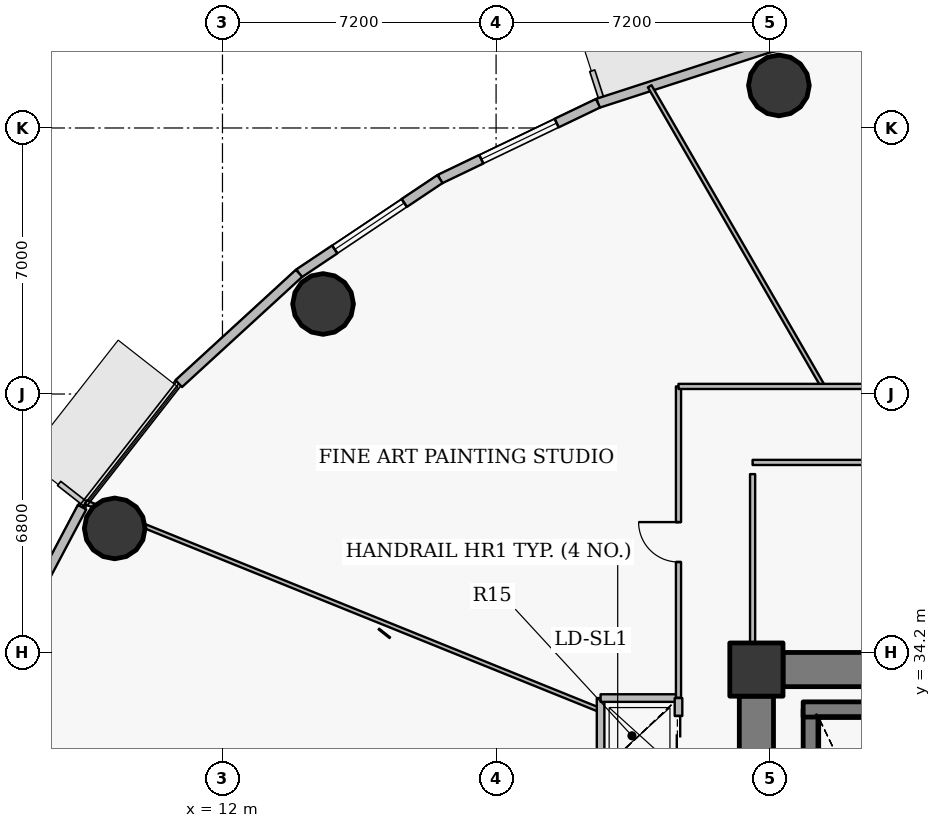
"""IFC4 building model, lengths in metres.
Left out: names, types, materials, properties, quantities, classifications, styles, units other than length and angle.
Written with IfcOpenShell. Run it as: python <this file> out.ifc"""

import sys

from ifc_helpers import new_model, si_unit, direction, frame, frame_2d, origin, origin_2d, place, context, subcontext, project, spatial, rectangle, hollow_circle, extrude, source, transform, mapped, element, fill, save


model = new_model("IFC4")
c1 = context("Model", 3, precision=1e-05, world=origin(), true_north=direction((0.0, 1.0)))
c2 = subcontext(c1, "Body", "Model", "MODEL_VIEW")
j1 = project(units=[si_unit("LENGTHUNIT", "METRE"), si_unit("PLANEANGLEUNIT", "RADIAN")], contexts=[c1])
p1 = place(None, origin())
s1 = spatial("IfcSite", under=j1, at=p1, CompositionType="ELEMENT")
p2 = place(p1, origin())
s2 = spatial("IfcBuilding", under=s1, at=p2, CompositionType="ELEMENT")
p3 = place(p2, frame((0.0, 0.0, 49.2)))
s3 = spatial("IfcBuildingStorey", under=s2, at=p3, CompositionType="ELEMENT", Elevation=49.2)
p4 = place(p3, frame((26.05, 33.75, 0.0), z_axis=(0.0, 0.0, 1.0), x_axis=(1.0, 0.0, 0.0)))
e1 = element("IfcColumn", 1, at=p4, inside=s3, PredefinedType="COLUMN", context=c2, shape_type="SweptSolid", body=[
    extrude(rectangle(XDim=1.4, YDim=1.4, at=origin_2d()), origin(), (0.0, 0.0, 1.0), 4.2),
])
p5 = place(p3, frame((27.48, 24.1, 0.0), z_axis=(0.0, 0.0, 1.0), x_axis=(0.0, 1.0, 0.0)))
e2 = element("IfcWall", 2, at=p5, inside=s3, PredefinedType="SHEAR", context=c2, shape_type="SweptSolid", body=[
    extrude(rectangle(XDim=8.6, YDim=0.4, at=frame_2d((4.3, 0.0))), origin(), (0.0, 0.0, 1.0), 4.2),
])
p6 = place(p3, frame((27.28, 32.7, 0.0), z_axis=(0.0, 0.0, 1.0), x_axis=(1.0, 0.0, 0.0)))
e3 = element("IfcWall", 3, at=p6, inside=s3, PredefinedType="SHEAR", context=c2, shape_type="SweptSolid", body=[
    extrude(rectangle(XDim=4.1, YDim=0.4, at=frame_2d((2.05, 0.0))), origin(), (0.0, 0.0, 1.0), 4.2),
])
p7 = place(p3, frame((26.75, 33.75, 0.0), z_axis=(0.0, 0.0, 1.0), x_axis=(1.0, 0.0, 0.0)))
e4 = element("IfcWall", 4, at=p7, inside=s3, PredefinedType="SHEAR", context=c2, shape_type="SweptSolid", body=[
    extrude(rectangle(XDim=18.5, YDim=0.9, at=frame_2d((9.25, 0.0))), origin(), (0.0, 0.0, 1.0), 3.4),
])
p8 = place(p3, frame((26.05, 20.95, 0.0), z_axis=(0.0, 0.0, 1.0), x_axis=(0.0, 1.0, 0.0)))
e5 = element("IfcWall", 5, at=p8, inside=s3, PredefinedType="SHEAR", context=c2, shape_type="SweptSolid", body=[
    extrude(rectangle(XDim=12.1, YDim=0.9, at=frame_2d((6.05, 0.0))), origin(), (0.0, 0.0, 1.0), 3.4),
])
p9 = place(p8, frame((5.64, 0.0, 0.0)))
e6 = element("IfcOpeningElement", 6, at=p9, cuts=e5, PredefinedType="OPENING", context=c2, shape_type="SweptSolid", body=[
    extrude(rectangle(XDim=0.82, YDim=2.1, at=origin_2d()), frame((0.41, 0.46, 1.05), z_axis=(0.0, -1.0, 0.0), x_axis=(1.0, 0.0, 0.0)), (0.0, 0.0, 1.0), 0.92),
])
for number, where, z_axis, x_axis in (
    (7, (26.642, 49.12, 0.0), (0.0, 0.0, 1.0), (1.0, 0.0, 0.0)),
    (8, (14.647, 43.369, 0.0), (0.0, 0.0, 1.0), (1.0, 0.0, 0.0)),
    (9, (9.165, 37.464, 0.0), (0.0, 0.0, 1.0), (1.0, 0.0, 0.0)),
):
    element("IfcColumn", number, at=place(p3, frame(where, z_axis=z_axis, x_axis=x_axis)), inside=s3, PredefinedType="COLUMN", context=c2, shape_type="SweptSolid", body=[
        extrude(hollow_circle(Radius=0.8, WallThickness=0.045, at=origin_2d()), origin(), (0.0, 0.0, 1.0), 4.2),
    ])
p10 = place(p3, frame((21.882, 48.651, 0.0), z_axis=(0.0, 0.0, 1.0), x_axis=(0.951207699013, 0.308551313946, 0.0)))
e10 = element("IfcWall", 10, at=p10, inside=s3, PredefinedType="SOLIDWALL", context=c2, shape_type="SweptSolid", body=[
    extrude(rectangle(XDim=4.739, YDim=0.25, at=frame_2d((2.369, 0.0))), origin(), (0.0, 0.0, 1.0), 3.95),
])
p11 = place(p3, frame((17.723, 46.656, 0.0), z_axis=(0.0, 0.0, 1.0), x_axis=(0.901601503137, 0.432567601123, 0.0)))
e11 = element("IfcWall", 11, at=p11, inside=s3, PredefinedType="SOLIDWALL", context=c2, shape_type="SweptSolid", body=[
    extrude(rectangle(XDim=4.613, YDim=0.25, at=frame_2d((2.306, 0.0))), origin(), (0.0, 0.0, 1.0), 3.95),
])
p12 = place(p11, frame((1.207, 0.0, 0.9)))
e12 = element("IfcOpeningElement", 12, at=p12, cuts=e11, PredefinedType="OPENING", context=c2, shape_type="SweptSolid", body=[
    extrude(rectangle(XDim=2.2, YDim=2.0, at=origin_2d()), frame((1.1, 0.135, 1.0), z_axis=(0.0, -1.0, 0.0), x_axis=(1.0, 0.0, 0.0)), (0.0, 0.0, 1.0), 0.27),
])
p13 = place(p3, frame((14.015, 44.176, 0.0), z_axis=(0.0, 0.0, 1.0), x_axis=(0.831240982525, 0.555912249343, 0.0)))
e13 = element("IfcWall", 13, at=p13, inside=s3, PredefinedType="SOLIDWALL", context=c2, shape_type="SweptSolid", body=[
    extrude(rectangle(XDim=4.46, YDim=0.25, at=frame_2d((2.23, 0.0))), origin(), (0.0, 0.0, 1.0), 3.95),
])
p14 = place(p13, frame((1.13, 0.0, 0.9)))
e14 = element("IfcOpeningElement", 14, at=p14, cuts=e13, PredefinedType="OPENING", context=c2, shape_type="SweptSolid", body=[
    extrude(rectangle(XDim=2.2, YDim=2.0, at=origin_2d()), frame((1.1, 0.135, 1.0), z_axis=(0.0, -1.0, 0.0), x_axis=(1.0, 0.0, 0.0)), (0.0, 0.0, 1.0), 0.27),
])
p15 = place(p3, frame((10.85, 41.275, 0.0), z_axis=(0.0, 0.0, 1.0), x_axis=(0.737116376281, 0.67576582321, 0.0)))
e15 = element("IfcWall", 15, at=p15, inside=s3, PredefinedType="SOLIDWALL", context=c2, shape_type="SweptSolid", body=[
    extrude(rectangle(XDim=4.294, YDim=0.25, at=frame_2d((2.147, 0.0))), origin(), (0.0, 0.0, 1.0), 3.95),
])
p16 = place(p3, frame((6.442, 34.501, 0.0), z_axis=(0.0, 0.0, 1.0), x_axis=(0.467662443071, 0.883907144072, 0.0)))
e16 = element("IfcWall", 16, at=p16, inside=s3, PredefinedType="SOLIDWALL", context=c2, shape_type="SweptSolid", body=[
    extrude(rectangle(XDim=3.984, YDim=0.25, at=frame_2d((1.992, 0.0))), origin(), (0.0, 0.0, 1.0), 3.95),
])
p17 = place(p3, frame((8.4, 38.151, 0.0), z_axis=(0.0, 0.0, 1.0), x_axis=(0.927179581649, -0.374617169084, 0.0)))
e17 = element("IfcWall", 17, at=p17, inside=s3, PredefinedType="MOVABLE", context=c2, shape_type="SweptSolid", body=[
    extrude(rectangle(XDim=14.615, YDim=0.11, at=frame_2d((7.307, 0.0))), origin(), (0.0, 0.0, 1.0), 3.285),
])
p18 = place(p3, frame((21.95, 31.12, 0.0), z_axis=(0.0, 0.0, 1.0), x_axis=(0.0, 1.0, 0.0)))
e18 = element("IfcWall", 18, at=p18, inside=s3, PredefinedType="PARTITIONING", context=c2, shape_type="SweptSolid", body=[
    extrude(rectangle(XDim=1.88, YDim=0.2, at=frame_2d((0.94, 0.0))), origin(), (0.0, 0.0, 1.0), 3.285),
])
p19 = place(p3, frame((21.95, 33.0, 0.0), z_axis=(0.0, 0.0, 1.0), x_axis=(1.0, 0.0, 0.0)))
e19 = element("IfcWall", 19, at=p19, inside=s3, PredefinedType="PARTITIONING", context=c2, shape_type="SweptSolid", body=[
    extrude(rectangle(XDim=2.05, YDim=0.2, at=frame_2d((1.025, 0.0))), origin(), (0.0, 0.0, 1.0), 3.95),
])
p20 = place(p3, frame((23.242, 49.098, 0.0), z_axis=(0.0, 0.0, 1.0), x_axis=(0.499985867395, -0.866033563094, 0.0)))
e20 = element("IfcWall", 20, at=p20, inside=s3, PredefinedType="MOVABLE", context=c2, shape_type="SweptSolid", body=[
    extrude(rectangle(XDim=9.119, YDim=0.11, at=frame_2d((4.56, 0.0))), origin(), (0.0, 0.0, 1.0), 3.335),
])
p21 = place(p3, frame((24.0, 27.59, 0.0), z_axis=(0.0, 0.0, 1.0), x_axis=(0.0, 1.0, 0.0)))
e21 = element("IfcWall", 21, at=p21, inside=s3, PredefinedType="PARTITIONING", context=c2, shape_type="SweptSolid", body=[
    extrude(rectangle(XDim=5.41, YDim=0.2, at=frame_2d((2.705, 0.0))), origin(), (0.0, 0.0, 1.0), 3.285),
])
p22 = place(p21, frame((1.185, 0.0, 0.0)))
e22 = element("IfcOpeningElement", 22, at=p22, cuts=e21, PredefinedType="OPENING", context=c2, shape_type="SweptSolid", body=[
    extrude(rectangle(XDim=1.2, YDim=2.15, at=origin_2d()), frame((0.6, 0.11, 1.075), z_axis=(0.0, -1.0, 0.0), x_axis=(1.0, 0.0, 0.0)), (0.0, 0.0, 1.0), 0.22),
])
p23 = place(p21, frame((3.89, 0.0, 0.0)))
e23 = element("IfcOpeningElement", 23, at=p23, cuts=e21, PredefinedType="OPENING", context=c2, shape_type="SweptSolid", body=[
    extrude(rectangle(XDim=1.05, YDim=2.15, at=origin_2d()), frame((0.525, 0.11, 1.075), z_axis=(0.0, -1.0, 0.0), x_axis=(1.0, 0.0, 0.0)), (0.0, 0.0, 1.0), 0.22),
])
p24 = place(p3, frame((24.0, 33.01, 0.0), z_axis=(0.0, 0.0, 1.0), x_axis=(0.0, 1.0, 0.0)))
e24 = element("IfcWall", 24, at=p24, inside=s3, PredefinedType="PARTITIONING", context=c2, shape_type="SweptSolid", body=[
    extrude(rectangle(XDim=8.19, YDim=0.135, at=frame_2d((4.095, 0.0))), origin(), (0.0, 0.0, 1.0), 3.285),
])
p25 = place(p24, frame((3.57, 0.0, 0.0)))
e25 = element("IfcOpeningElement", 25, at=p25, cuts=e24, PredefinedType="OPENING", context=c2, shape_type="SweptSolid", body=[
    extrude(rectangle(XDim=1.05, YDim=2.15, at=origin_2d()), frame((0.525, 0.078, 1.075), z_axis=(0.0, -1.0, 0.0), x_axis=(1.0, 0.0, 0.0)), (0.0, 0.0, 1.0), 0.155),
])
p26 = place(p3, frame((24.0, 41.2, 0.0), z_axis=(0.0, 0.0, 1.0), x_axis=(1.0, 0.0, 0.0)))
e26 = element("IfcWall", 26, at=p26, inside=s3, PredefinedType="PARTITIONING", context=c2, shape_type="SweptSolid", body=[
    extrude(rectangle(XDim=24.0, YDim=0.135, at=frame_2d((12.0, 0.0))), origin(), (0.0, 0.0, 1.0), 3.285),
])
p27 = place(p26, frame((15.574, 0.0, 0.0)))
e27 = element("IfcOpeningElement", 27, at=p27, cuts=e26, PredefinedType="OPENING", context=c2, shape_type="SweptSolid", body=[
    extrude(rectangle(XDim=1.05, YDim=2.15, at=origin_2d()), frame((0.525, 0.078, 1.075), z_axis=(0.0, -1.0, 0.0), x_axis=(1.0, 0.0, 0.0)), (0.0, 0.0, 1.0), 0.155),
])
p28 = place(p26, frame((7.376, 0.0, 0.0)))
e28 = element("IfcOpeningElement", 28, at=p28, cuts=e26, PredefinedType="OPENING", context=c2, shape_type="SweptSolid", body=[
    extrude(rectangle(XDim=1.05, YDim=2.15, at=origin_2d()), frame((0.525, 0.078, 1.075), z_axis=(0.0, -1.0, 0.0), x_axis=(1.0, 0.0, 0.0)), (0.0, 0.0, 1.0), 0.155),
])
p29 = place(p3, frame((38.893, 39.2, 0.0), z_axis=(0.0, 0.0, 1.0), x_axis=(-1.0, 0.0, 0.0)))
e29 = element("IfcWall", 29, at=p29, inside=s3, PredefinedType="PARTITIONING", context=c2, shape_type="SweptSolid", body=[
    extrude(rectangle(XDim=12.943, YDim=0.135, at=frame_2d((6.471, 0.0))), origin(), (0.0, 0.0, 1.0), 3.285),
])
p30 = place(p3, frame((25.95, 38.893, 0.0), z_axis=(0.0, 0.0, 1.0), x_axis=(0.0, -1.0, 0.0)))
e30 = element("IfcWall", 30, at=p30, inside=s3, PredefinedType="PARTITIONING", context=c2, shape_type="SweptSolid", body=[
    extrude(rectangle(XDim=4.693, YDim=0.135, at=frame_2d((2.346, 0.0))), origin(), (0.0, 0.0, 1.0), 3.285),
])
p31 = place(p3, frame((25.6, 34.2, 0.0), z_axis=(0.0, 0.0, 1.0), x_axis=(0.0, -1.0, 0.0)))
e31 = element("IfcWall", 31, at=p31, inside=s3, PredefinedType="PARTITIONING", context=c2, shape_type="SweptSolid", body=[
    extrude(rectangle(XDim=1.14, YDim=0.135, at=frame_2d((0.57, 0.0))), origin(), (0.0, 0.0, 1.0), 3.95),
])
m1 = source(origin(), c2, "Body", "SweptSolid", [
    extrude(rectangle(XDim=2.2, YDim=2.0, at=origin_2d()), frame((1.1, 0.03, 1.0), z_axis=(0.0, -1.0, 0.0), x_axis=(1.0, 0.0, 0.0)), (0.0, 0.0, 1.0), 0.06),
])
p32 = place(p12, origin())
e32 = element("IfcWindow", 32, at=p32, inside=s3, PartitioningType="TRIPLE_PANEL_VERTICAL", PredefinedType="WINDOW", context=c2, shape_type="MappedRepresentation", body=[
    mapped(m1, transform((0.0, 0.0, 0.0), x_axis=(1.0, 0.0, 0.0), y_axis=(0.0, 1.0, 0.0), z_axis=(0.0, 0.0, 1.0), scale=1.0)),
])
fill(e12, e32)
p33 = place(p14, origin())
e33 = element("IfcWindow", 33, at=p33, inside=s3, PartitioningType="TRIPLE_PANEL_VERTICAL", PredefinedType="WINDOW", context=c2, shape_type="MappedRepresentation", body=[
    mapped(m1, transform((0.0, 0.0, 0.0), x_axis=(1.0, 0.0, 0.0), y_axis=(0.0, 1.0, 0.0), z_axis=(0.0, 0.0, 1.0), scale=1.0)),
])
fill(e14, e33)
m2 = source(origin(), c2, "Body", "SweptSolid", [
    extrude(rectangle(XDim=1.05, YDim=2.15, at=origin_2d()), frame((0.525, 0.025, 1.075), z_axis=(0.0, -1.0, 0.0), x_axis=(1.0, 0.0, 0.0)), (0.0, 0.0, 1.0), 0.05),
])
p34 = place(p23, origin())
e34 = element("IfcDoor", 34, at=p34, inside=s3, OperationType="DOUBLE_DOOR_SLIDING", PredefinedType="USERDEFINED", context=c2, shape_type="MappedRepresentation", body=[
    mapped(m2, transform((0.0, 0.0, 0.0), x_axis=(1.0, 0.0, 0.0), y_axis=(0.0, 1.0, 0.0), z_axis=(0.0, 0.0, 1.0), scale=1.0)),
])
fill(e23, e34)
m3 = source(origin(), c2, "Body", "SweptSolid", [
    extrude(rectangle(XDim=1.05, YDim=2.15, at=origin_2d()), frame((0.525, 0.025, 1.075), z_axis=(0.0, -1.0, 0.0), x_axis=(1.0, 0.0, 0.0)), (0.0, 0.0, 1.0), 0.05),
])
p35 = place(p25, origin())
e35 = element("IfcDoor", 35, at=p35, inside=s3, OperationType="SINGLE_SWING_RIGHT", PredefinedType="DOOR", context=c2, shape_type="MappedRepresentation", body=[
    mapped(m3, transform((0.0, 0.0, 0.0), x_axis=(1.0, 0.0, 0.0), y_axis=(0.0, 1.0, 0.0), z_axis=(0.0, 0.0, 1.0), scale=1.0)),
])
fill(e25, e35)
save(model, sys.argv[1])
